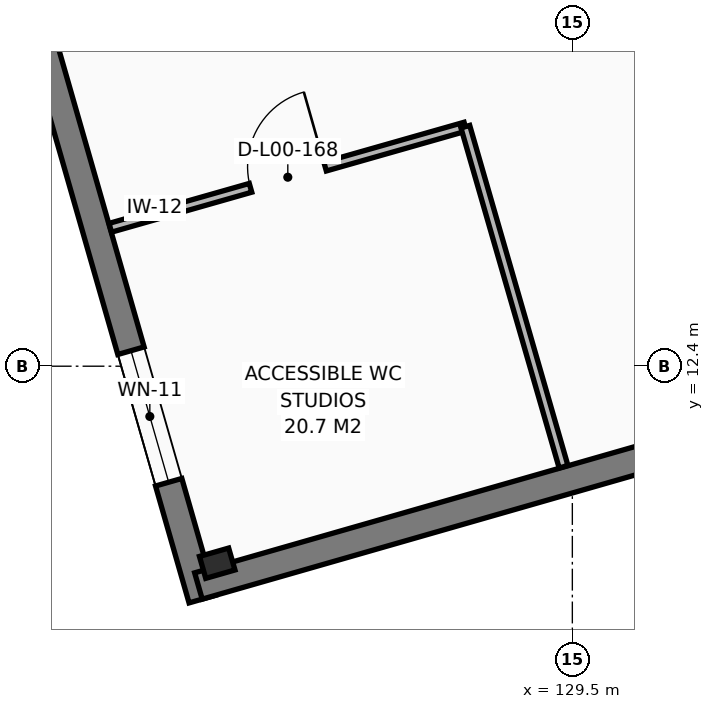
"""IFC4 building model, lengths in metres.
Left out: names, types, materials, properties, quantities, classifications, styles, units other than length and angle.
Written with IfcOpenShell. Run it as: python <this file> out.ifc"""

import sys

from ifc_helpers import new_model, si_unit, direction, frame, frame_2d, origin, origin_2d, place, context, subcontext, project, spatial, rectangle, i_section, extrude, element, fill, save


model = new_model("IFC4")
c1 = context("Model", 3, precision=1e-05, world=origin(), true_north=direction((0.0, 1.0)))
c2 = subcontext(c1, "Body", "Model", "MODEL_VIEW")
j1 = project(units=[si_unit("LENGTHUNIT", "METRE"), si_unit("PLANEANGLEUNIT", "RADIAN")], contexts=[c1])
p1 = place(None, origin())
s1 = spatial("IfcSite", under=j1, at=p1, CompositionType="ELEMENT")
p2 = place(p1, origin())
s2 = spatial("IfcBuilding", under=s1, at=p2, CompositionType="ELEMENT")
p3 = place(p2, origin())
s3 = spatial("IfcBuildingStorey", under=s2, at=p3, CompositionType="ELEMENT", Elevation=0.0)
p4 = place(p3, frame((124.827, 9.808, 0.0), z_axis=(0.0, 0.0, 1.0), x_axis=(0.961261695938, 0.275637355817, 0.0)))
e1 = element("IfcColumn", 1, at=p4, inside=s3, PredefinedType="COLUMN", context=c2, shape_type="SweptSolid", body=[
    extrude(i_section(OverallWidth=0.3, OverallDepth=0.4, WebThickness=0.013, FlangeThickness=0.024, FilletRadius=0.027, at=origin_2d()), origin(), (0.0, 0.0, 1.0), 5.1),
])
p5 = place(p3, frame((124.63, 9.335, 0.0), z_axis=(0.0, 0.0, 1.0), x_axis=(-0.275639059054, 0.961261207541, 0.0)))
e2 = element("IfcWall", 2, at=p5, inside=s3, PredefinedType="SOLIDWALL", context=c2, shape_type="SweptSolid", body=[
    extrude(rectangle(XDim=23.287, YDim=0.36, at=frame_2d((11.643, 0.0))), origin(), (0.0, 0.0, 1.0), 4.88),
])
p6 = place(p5, frame((1.6, 0.0, 0.85)))
e3 = element("IfcOpeningElement", 3, at=p6, cuts=e2, PredefinedType="OPENING", context=c2, shape_type="SweptSolid", body=[
    extrude(rectangle(XDim=1.8, YDim=1.7, at=frame_2d((0.9, 0.85))), frame((0.0, 0.19, 0.0), z_axis=(0.0, -1.0, 0.0), x_axis=(1.0, 0.0, 0.0)), (0.0, 0.0, 1.0), 0.38),
])
p7 = place(p5, frame((14.991, 0.0, 0.85)))
e4 = element("IfcOpeningElement", 4, at=p7, cuts=e2, PredefinedType="OPENING", context=c2, shape_type="SweptSolid", body=[
    extrude(rectangle(XDim=2.0, YDim=1.3, at=frame_2d((1.0, 0.65))), frame((0.0, 0.19, 0.0), z_axis=(0.0, -1.0, 0.0), x_axis=(1.0, 0.0, 0.0)), (0.0, 0.0, 1.0), 0.38),
])
p8 = place(p3, frame((160.936, 19.933, 0.0), z_axis=(0.0, 0.0, 1.0), x_axis=(-0.961262132762, -0.275635832428, 0.0)))
e5 = element("IfcWall", 5, at=p8, inside=s3, PredefinedType="SOLIDWALL", context=c2, shape_type="SweptSolid", body=[
    extrude(rectangle(XDim=37.82, YDim=0.36, at=frame_2d((18.91, 0.0))), origin(), (0.0, 0.0, 1.0), 4.88),
])
p9 = place(p8, frame((2.8, 0.0, 0.0)))
e6 = element("IfcOpeningElement", 6, at=p9, cuts=e5, PredefinedType="OPENING", context=c2, shape_type="SweptSolid", body=[
    extrude(rectangle(XDim=1.8, YDim=2.25, at=frame_2d((0.9, 1.125))), frame((0.0, 0.19, 0.0), z_axis=(0.0, -1.0, 0.0), x_axis=(1.0, 0.0, 0.0)), (0.0, 0.0, 1.0), 0.38),
])
p10 = place(p8, frame((8.524, 0.0, 0.85)))
e7 = element("IfcOpeningElement", 7, at=p10, cuts=e5, PredefinedType="OPENING", context=c2, shape_type="SweptSolid", body=[
    extrude(rectangle(XDim=1.6, YDim=1.6, at=frame_2d((0.8, 0.8))), frame((0.0, 0.19, 0.0), z_axis=(0.0, -1.0, 0.0), x_axis=(1.0, 0.0, 0.0)), (0.0, 0.0, 1.0), 0.38),
])
p11 = place(p8, frame((15.448, 0.0, 0.85)))
e8 = element("IfcOpeningElement", 8, at=p11, cuts=e5, PredefinedType="OPENING", context=c2, shape_type="SweptSolid", body=[
    extrude(rectangle(XDim=1.9, YDim=1.6, at=frame_2d((0.95, 0.8))), frame((0.0, 0.19, 0.0), z_axis=(0.0, -1.0, 0.0), x_axis=(1.0, 0.0, 0.0)), (0.0, 0.0, 1.0), 0.38),
])
p12 = place(p8, frame((29.296, 0.0, 0.85)))
e9 = element("IfcOpeningElement", 9, at=p12, cuts=e5, PredefinedType="OPENING", context=c2, shape_type="SweptSolid", body=[
    extrude(rectangle(XDim=1.35, YDim=1.5, at=frame_2d((0.675, 0.75))), frame((0.0, 0.19, 0.0), z_axis=(0.0, -1.0, 0.0), x_axis=(1.0, 0.0, 0.0)), (0.0, 0.0, 1.0), 0.38),
])
p13 = place(p3, frame((123.421, 14.221, 0.0), z_axis=(0.0, 0.0, 1.0), x_axis=(0.961747444681, 0.27393768023, 0.0)))
e10 = element("IfcWall", 10, at=p13, inside=s3, PredefinedType="PARTITIONING", context=c2, shape_type="SweptSolid", body=[
    extrude(rectangle(XDim=4.857, YDim=0.12, at=frame_2d((2.429, 0.0))), origin(), (0.0, 0.0, 1.0), 4.42),
])
p14 = place(p13, frame((1.919, 0.0, 0.0)))
e11 = element("IfcOpeningElement", 11, at=p14, cuts=e10, PredefinedType="OPENING", context=c2, shape_type="SweptSolid", body=[
    extrude(rectangle(XDim=1.02, YDim=2.12, at=frame_2d((0.51, 1.06))), frame((0.0, 0.07, 0.0), z_axis=(0.0, -1.0, 0.0), x_axis=(1.0, 0.0, 0.0)), (0.0, 0.0, 1.0), 0.14),
])
p15 = place(p3, frame((128.092, 15.552, 0.0), z_axis=(0.0, 0.0, 1.0), x_axis=(0.277468689072, -0.96073468064, 0.0)))
e12 = element("IfcWall", 12, at=p15, inside=s3, PredefinedType="PARTITIONING", context=c2, shape_type="SweptSolid", body=[
    extrude(rectangle(XDim=4.657, YDim=0.12, at=frame_2d((2.329, 0.0))), origin(), (0.0, 0.0, 1.0), 4.37),
])
p16 = place(p6, origin())
e13 = element("IfcWindow", 13, at=p16, inside=s3, PartitioningType="SINGLE_PANEL", PredefinedType="WINDOW", context=c2, shape_type="SweptSolid", body=[
    extrude(rectangle(XDim=1.8, YDim=1.7, at=frame_2d((0.9, 0.85))), frame((0.0, 0.03, 0.0), z_axis=(0.0, -1.0, 0.0), x_axis=(1.0, 0.0, 0.0)), (0.0, 0.0, 1.0), 0.06),
])
fill(e3, e13)
p17 = place(p14, origin())
e14 = element("IfcDoor", 14, at=p17, inside=s3, OperationType="SINGLE_SWING_RIGHT", PredefinedType="DOOR", context=c2, shape_type="SweptSolid", body=[
    extrude(rectangle(XDim=1.02, YDim=2.12, at=frame_2d((0.51, 1.06))), frame((0.0, 0.025, 0.0), z_axis=(0.0, -1.0, 0.0), x_axis=(1.0, 0.0, 0.0)), (0.0, 0.0, 1.0), 0.05),
])
fill(e11, e14)
save(model, sys.argv[1])
